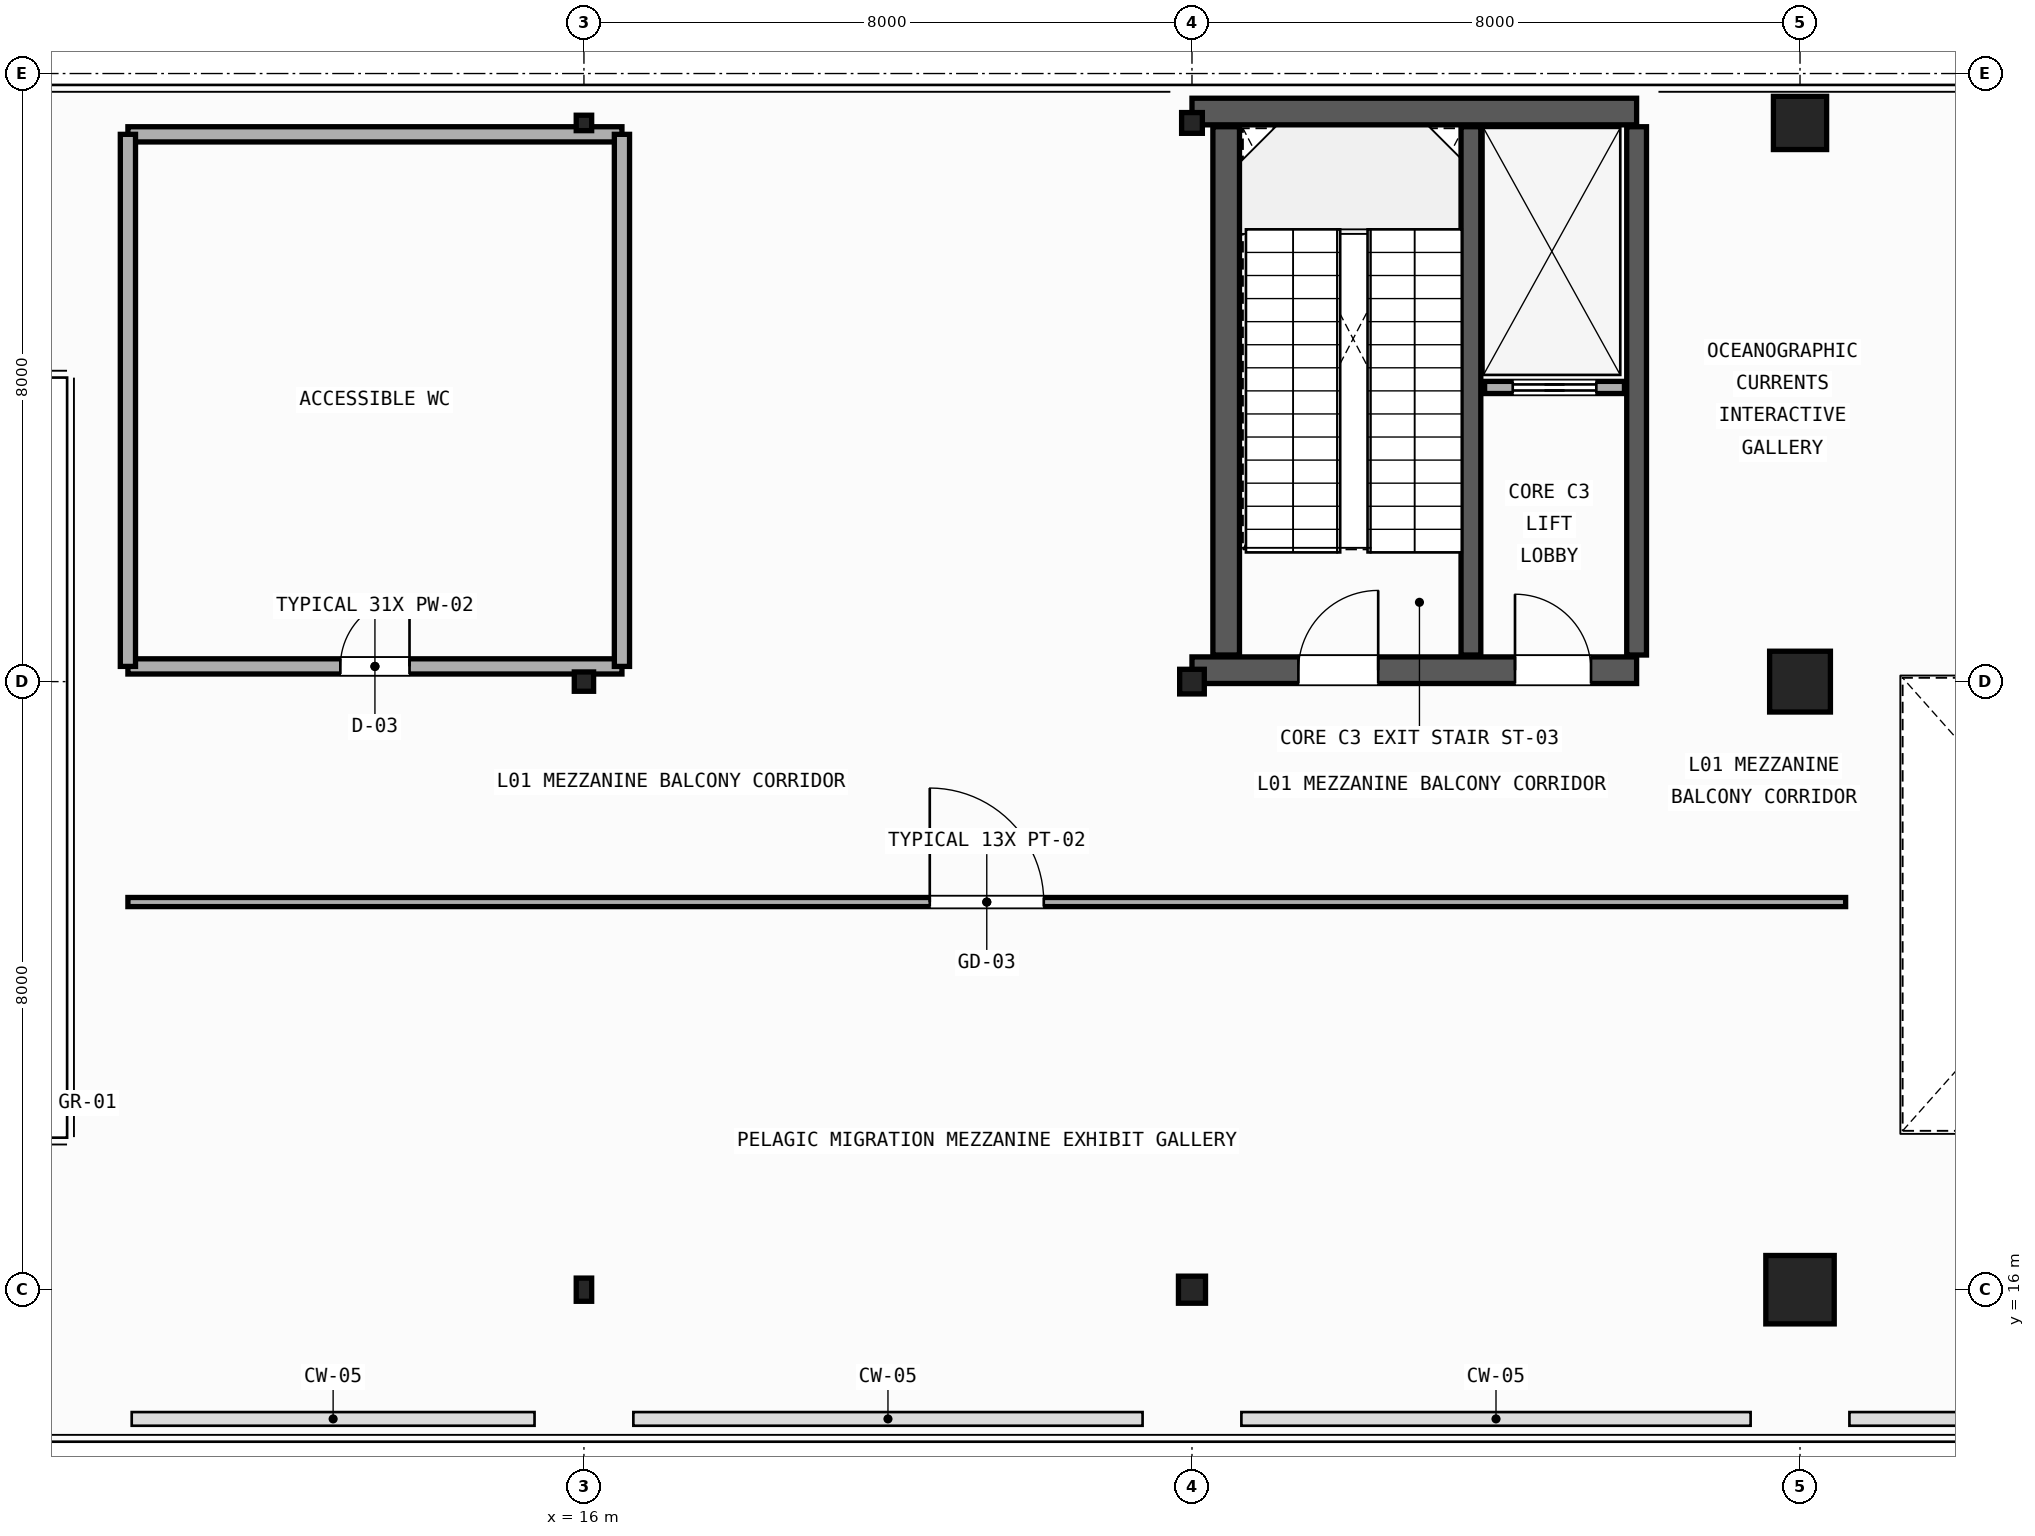
"""IFC4 building model, lengths in metres.
Left out: names, types, materials, properties, quantities, classifications, styles, units other than length and angle.
Written with IfcOpenShell. Run it as: python <this file> out.ifc"""

import sys

from ifc_helpers import new_model, si_unit, direction, frame, frame_2d, origin, origin_2d, place, context, subcontext, project, spatial, rectangle, hollow_rectangle, hollow_circle, extrude, element, fill, save


model = new_model("IFC4")
c1 = context("Model", 3, precision=1e-05, world=origin(), true_north=direction((0.0, 1.0)))
c2 = subcontext(c1, "Body", "Model", "MODEL_VIEW")
j1 = project(units=[si_unit("LENGTHUNIT", "METRE"), si_unit("PLANEANGLEUNIT", "RADIAN")], contexts=[c1])
p1 = place(None, origin())
s1 = spatial("IfcSite", under=j1, at=p1, CompositionType="ELEMENT")
p2 = place(p1, origin())
s2 = spatial("IfcBuilding", under=s1, at=p2, CompositionType="ELEMENT")
p3 = place(p2, frame((0.0, 0.0, 5.4)))
s3 = spatial("IfcBuildingStorey", under=s2, at=p3, CompositionType="ELEMENT", Elevation=5.4)
p4 = place(p3, frame((16.0, 16.0, 0.0), z_axis=(0.0, 0.0, 1.0), x_axis=(1.0, 0.0, 0.0)))
e1 = element("IfcColumn", 1, at=p4, inside=s3, PredefinedType="COLUMN", context=c2, shape_type="SweptSolid", body=[
    extrude(hollow_rectangle(XDim=0.203, YDim=0.305, WallThickness=0.009, InnerFilletRadius=0.009, OuterFilletRadius=0.018, at=origin_2d()), origin(), (0.0, 0.0, 1.0), 4.8),
])
p5 = place(p3, frame((16.0, 24.0, 0.0), z_axis=(0.0, 0.0, 1.0), x_axis=(0.0, 1.0, 0.0)))
e2 = element("IfcColumn", 2, at=p5, inside=s3, PredefinedType="COLUMN", context=c2, shape_type="SweptSolid", body=[
    extrude(hollow_rectangle(XDim=0.254, YDim=0.254, WallThickness=0.012, InnerFilletRadius=0.012, OuterFilletRadius=0.024, at=origin_2d()), origin(), (0.0, 0.0, 1.0), 4.54),
])
p6 = place(p3, frame((16.0, 31.35, 0.0), z_axis=(0.0, 0.0, 1.0), x_axis=(1.0, 0.0, 0.0)))
e3 = element("IfcColumn", 3, at=p6, inside=s3, PredefinedType="COLUMN", context=c2, shape_type="SweptSolid", body=[
    extrude(hollow_rectangle(XDim=0.203, YDim=0.203, WallThickness=0.009, InnerFilletRadius=0.009, OuterFilletRadius=0.018, at=origin_2d()), origin(), (0.0, 0.0, 1.0), 4.54),
])
p7 = place(p3, frame((24.0, 16.0, 0.0), z_axis=(0.0, 0.0, 1.0), x_axis=(0.0, 1.0, 0.0)))
e4 = element("IfcColumn", 4, at=p7, inside=s3, PredefinedType="COLUMN", context=c2, shape_type="SweptSolid", body=[
    extrude(hollow_circle(Radius=0.178, WallThickness=0.012, at=origin_2d()), origin(), (0.0, 0.0, 1.0), 4.8),
])
p8 = place(p3, frame((24.0, 24.0, 0.0), z_axis=(0.0, 0.0, 1.0), x_axis=(1.0, 0.0, 0.0)))
e5 = element("IfcColumn", 5, at=p8, inside=s3, PredefinedType="COLUMN", context=c2, shape_type="SweptSolid", body=[
    extrude(hollow_circle(Radius=0.162, WallThickness=0.012, at=origin_2d()), origin(), (0.0, 0.0, 1.0), 4.54),
])
p9 = place(p3, frame((24.0, 31.35, 0.0), z_axis=(0.0, 0.0, 1.0), x_axis=(0.0, 1.0, 0.0)))
e6 = element("IfcColumn", 6, at=p9, inside=s3, PredefinedType="COLUMN", context=c2, shape_type="SweptSolid", body=[
    extrude(hollow_circle(Radius=0.136, WallThickness=0.012, at=origin_2d()), origin(), (0.0, 0.0, 1.0), 4.54),
])
p10 = place(p3, frame((32.0, 16.0, 0.0), z_axis=(0.0, 0.0, 1.0), x_axis=(1.0, 0.0, 0.0)))
e7 = element("IfcColumn", 7, at=p10, inside=s3, PredefinedType="COLUMN", context=c2, shape_type="SweptSolid", body=[
    extrude(rectangle(XDim=0.9, YDim=0.9, at=origin_2d()), origin(), (0.0, 0.0, 1.0), 4.8),
])
p11 = place(p3, frame((32.0, 24.0, 0.0), z_axis=(0.0, 0.0, 1.0), x_axis=(0.0, 1.0, 0.0)))
e8 = element("IfcColumn", 8, at=p11, inside=s3, PredefinedType="COLUMN", context=c2, shape_type="SweptSolid", body=[
    extrude(rectangle(XDim=0.8, YDim=0.8, at=origin_2d()), origin(), (0.0, 0.0, 1.0), 4.54),
])
p12 = place(p3, frame((32.0, 31.35, 0.0), z_axis=(0.0, 0.0, 1.0), x_axis=(1.0, 0.0, 0.0)))
e9 = element("IfcColumn", 9, at=p12, inside=s3, PredefinedType="COLUMN", context=c2, shape_type="SweptSolid", body=[
    extrude(rectangle(XDim=0.7, YDim=0.7, at=origin_2d()), origin(), (0.0, 0.0, 1.0), 4.54),
])
p13 = place(p3, frame((24.0, 24.15, 0.0), z_axis=(0.0, 0.0, 1.0), x_axis=(1.0, 0.0, 0.0)))
e10 = element("IfcWall", 10, at=p13, inside=s3, PredefinedType="SHEAR", context=c2, shape_type="SweptSolid", body=[
    extrude(rectangle(XDim=5.85, YDim=0.35, at=frame_2d((2.925, 0.0))), origin(), (0.0, 0.0, 1.0), 4.53),
])
p14 = place(p13, frame((1.4, 0.0, 0.0)))
e11 = element("IfcOpeningElement", 11, at=p14, cuts=e10, PredefinedType="OPENING", context=c2, shape_type="SweptSolid", body=[
    extrude(rectangle(XDim=1.05, YDim=2.1, at=frame_2d((0.525, 1.05))), frame((0.0, 0.185, 0.0), z_axis=(0.0, -1.0, 0.0), x_axis=(1.0, 0.0, 0.0)), (0.0, 0.0, 1.0), 0.37),
])
p15 = place(p13, frame((4.25, 0.0, 0.0)))
e12 = element("IfcOpeningElement", 12, at=p15, cuts=e10, PredefinedType="OPENING", context=c2, shape_type="SweptSolid", body=[
    extrude(rectangle(XDim=1.0, YDim=2.15, at=frame_2d((0.5, 1.075))), frame((0.0, 0.185, 0.0), z_axis=(0.0, -1.0, 0.0), x_axis=(1.0, 0.0, 0.0)), (0.0, 0.0, 1.0), 0.37),
])
p16 = place(p3, frame((24.0, 31.5, 0.0), z_axis=(0.0, 0.0, 1.0), x_axis=(1.0, 0.0, 0.0)))
e13 = element("IfcWall", 13, at=p16, inside=s3, PredefinedType="SHEAR", context=c2, shape_type="SweptSolid", body=[
    extrude(rectangle(XDim=5.85, YDim=0.35, at=frame_2d((2.925, 0.0))), origin(), (0.0, 0.0, 1.0), 4.53),
])
p17 = place(p3, frame((24.45, 24.35, 0.0), z_axis=(0.0, 0.0, 1.0), x_axis=(0.0, 1.0, 0.0)))
e14 = element("IfcWall", 14, at=p17, inside=s3, PredefinedType="SHEAR", context=c2, shape_type="SweptSolid", body=[
    extrude(rectangle(XDim=6.95, YDim=0.35, at=frame_2d((3.475, 0.0))), origin(), (0.0, 0.0, 1.0), 4.53),
])
for number, where, z_axis, x_axis in (
    (15, (29.85, 24.35, 0.0), (0.0, 0.0, 1.0), (0.0, 1.0, 0.0)),
    (16, (27.67, 24.35, 0.0), (0.0, 0.0, 1.0), (0.0, 1.0, 0.0)),
):
    element("IfcWall", number, at=place(p3, frame(where, z_axis=z_axis, x_axis=x_axis)), inside=s3, PredefinedType="SHEAR", context=c2, shape_type="SweptSolid", body=[
        extrude(rectangle(XDim=6.95, YDim=0.26, at=frame_2d((3.475, 0.0))), origin(), (0.0, 0.0, 1.0), 4.53),
    ])
p18 = place(p3, frame((27.85, 27.87, 0.0), z_axis=(0.0, 0.0, 1.0), x_axis=(1.0, 0.0, 0.0)))
e17 = element("IfcWall", 17, at=p18, inside=s3, PredefinedType="PARTITIONING", context=c2, shape_type="SweptSolid", body=[
    extrude(rectangle(XDim=1.84, YDim=0.16, at=frame_2d((0.92, 0.0))), origin(), (0.0, 0.0, 1.0), 3.6),
])
p19 = place(p18, frame((0.37, 0.0, 0.0)))
e18 = element("IfcOpeningElement", 18, at=p19, cuts=e17, PredefinedType="OPENING", context=c2, shape_type="SweptSolid", body=[
    extrude(rectangle(XDim=1.1, YDim=2.15, at=frame_2d((0.55, 1.075))), frame((0.0, 0.09, 0.0), z_axis=(0.0, -1.0, 0.0), x_axis=(1.0, 0.0, 0.0)), (0.0, 0.0, 1.0), 0.18),
])
p20 = place(p3, frame((10.0, 21.1, 0.0), z_axis=(0.0, 0.0, 1.0), x_axis=(1.0, 0.0, 0.0)))
e19 = element("IfcWall", 19, at=p20, inside=s3, PredefinedType="PARTITIONING", context=c2, shape_type="SweptSolid", body=[
    extrude(rectangle(XDim=22.6, YDim=0.12, at=frame_2d((11.3, 0.0))), origin(), (0.0, 0.0, 1.0), 3.738),
])
p21 = place(p20, frame((10.55, 0.0, 0.0)))
e20 = element("IfcOpeningElement", 20, at=p21, cuts=e19, PredefinedType="OPENING", context=c2, shape_type="SweptSolid", body=[
    extrude(rectangle(XDim=1.5, YDim=2.3, at=frame_2d((0.75, 1.15))), frame((0.0, 0.07, 0.0), z_axis=(0.0, -1.0, 0.0), x_axis=(1.0, 0.0, 0.0)), (0.0, 0.0, 1.0), 0.14),
])
p22 = place(p3, frame((10.0, 24.2, 0.0), z_axis=(0.0, 0.0, 1.0), x_axis=(1.0, 0.0, 0.0)))
e21 = element("IfcWall", 21, at=p22, inside=s3, PredefinedType="PLUMBINGWALL", context=c2, shape_type="SweptSolid", body=[
    extrude(rectangle(XDim=6.5, YDim=0.2, at=frame_2d((3.25, 0.0))), origin(), (0.0, 0.0, 1.0), 3.738),
])
p23 = place(p22, frame((2.795, 0.0, 0.0)))
e22 = element("IfcOpeningElement", 22, at=p23, cuts=e21, PredefinedType="OPENING", context=c2, shape_type="SweptSolid", body=[
    extrude(rectangle(XDim=0.91, YDim=2.1, at=frame_2d((0.455, 1.05))), frame((0.0, 0.11, 0.0), z_axis=(0.0, -1.0, 0.0), x_axis=(1.0, 0.0, 0.0)), (0.0, 0.0, 1.0), 0.22),
])
p24 = place(p3, frame((10.0, 31.2, 0.0), z_axis=(0.0, 0.0, 1.0), x_axis=(1.0, 0.0, 0.0)))
e23 = element("IfcWall", 23, at=p24, inside=s3, PredefinedType="PLUMBINGWALL", context=c2, shape_type="SweptSolid", body=[
    extrude(rectangle(XDim=6.5, YDim=0.2, at=frame_2d((3.25, 0.0))), origin(), (0.0, 0.0, 1.0), 3.7),
])
for number, where, z_axis, x_axis in (
    (24, (10.0, 24.2, 0.0), (0.0, 0.0, 1.0), (0.0, 1.0, 0.0)),
    (25, (16.5, 24.2, 0.0), (0.0, 0.0, 1.0), (0.0, 1.0, 0.0)),
):
    element("IfcWall", number, at=place(p3, frame(where, z_axis=z_axis, x_axis=x_axis)), inside=s3, PredefinedType="PLUMBINGWALL", context=c2, shape_type="SweptSolid", body=[
        extrude(rectangle(XDim=7.0, YDim=0.2, at=frame_2d((3.5, 0.0))), origin(), (0.0, 0.0, 1.0), 4.29),
    ])
p25 = place(p19, origin())
e26 = element("IfcDoor", 26, at=p25, inside=s3, OperationType="SLIDING_TO_LEFT", PredefinedType="DOOR", context=c2, shape_type="SweptSolid", body=[
    extrude(rectangle(XDim=1.1, YDim=2.15, at=frame_2d((0.55, 1.075))), frame((0.0, 0.025, 0.0), z_axis=(0.0, -1.0, 0.0), x_axis=(1.0, 0.0, 0.0)), (0.0, 0.0, 1.0), 0.05),
])
fill(e18, e26)
p26 = place(p14, origin())
e27 = element("IfcDoor", 27, at=p26, inside=s3, OperationType="SINGLE_SWING_RIGHT", PredefinedType="DOOR", context=c2, shape_type="SweptSolid", body=[
    extrude(rectangle(XDim=1.05, YDim=2.1, at=frame_2d((0.525, 1.05))), frame((0.0, 0.025, 0.0), z_axis=(0.0, -1.0, 0.0), x_axis=(1.0, 0.0, 0.0)), (0.0, 0.0, 1.0), 0.05),
])
fill(e11, e27)
p27 = place(p15, origin())
e28 = element("IfcDoor", 28, at=p27, inside=s3, OperationType="SINGLE_SWING_LEFT", PredefinedType="DOOR", context=c2, shape_type="SweptSolid", body=[
    extrude(rectangle(XDim=1.0, YDim=2.15, at=frame_2d((0.5, 1.075))), frame((0.0, 0.025, 0.0), z_axis=(0.0, -1.0, 0.0), x_axis=(1.0, 0.0, 0.0)), (0.0, 0.0, 1.0), 0.05),
])
fill(e12, e28)
p28 = place(p21, origin())
e29 = element("IfcDoor", 29, at=p28, inside=s3, OperationType="SINGLE_SWING_LEFT", PredefinedType="DOOR", context=c2, shape_type="SweptSolid", body=[
    extrude(rectangle(XDim=1.5, YDim=2.3, at=frame_2d((0.75, 1.15))), frame((0.0, 0.025, 0.0), z_axis=(0.0, -1.0, 0.0), x_axis=(1.0, 0.0, 0.0)), (0.0, 0.0, 1.0), 0.05),
])
fill(e20, e29)
p29 = place(p23, origin())
e30 = element("IfcDoor", 30, at=p29, inside=s3, OperationType="SINGLE_SWING_RIGHT", PredefinedType="DOOR", context=c2, shape_type="SweptSolid", body=[
    extrude(rectangle(XDim=0.91, YDim=2.1, at=frame_2d((0.455, 1.05))), frame((0.0, 0.025, 0.0), z_axis=(0.0, -1.0, 0.0), x_axis=(1.0, 0.0, 0.0)), (0.0, 0.0, 1.0), 0.05),
])
fill(e22, e30)
save(model, sys.argv[1])
